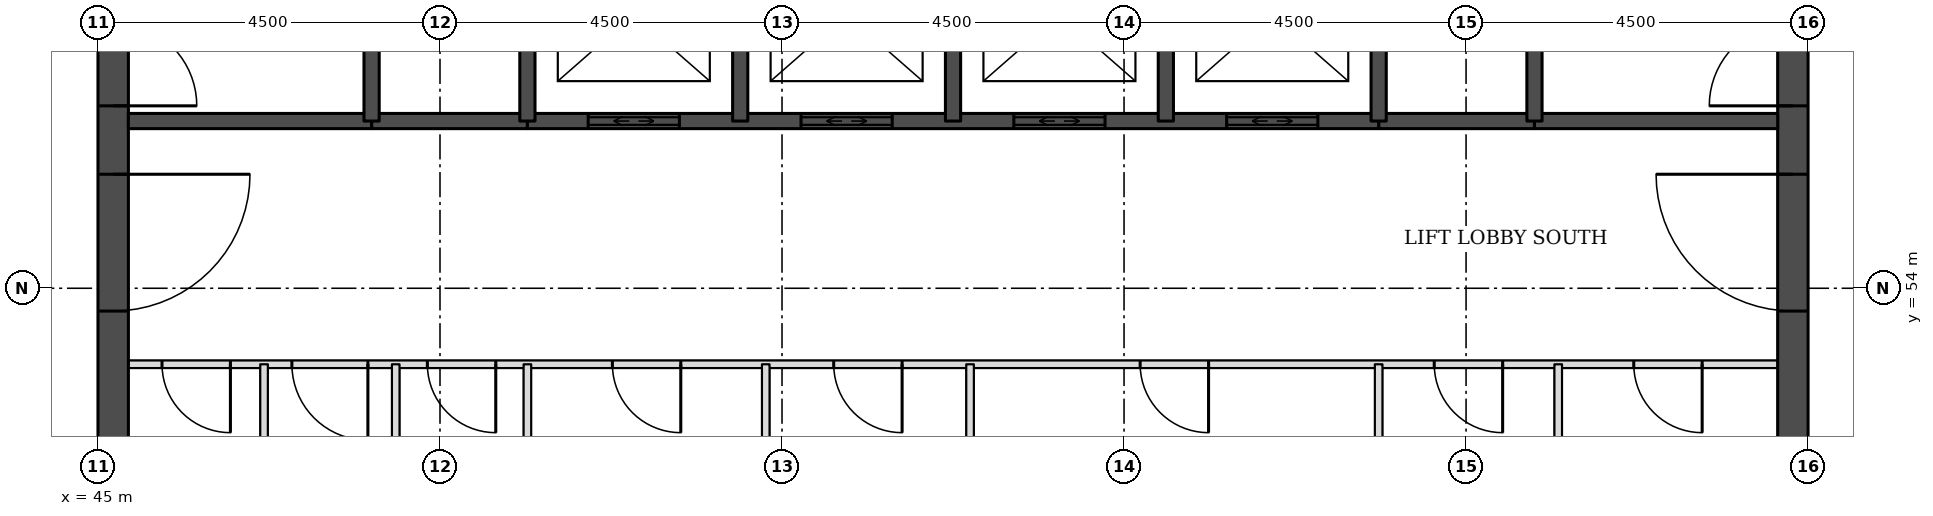
"""IFC4 building model, lengths in metres.
Left out: names, types, materials, properties, quantities, classifications, styles, units other than length and angle.
Written with IfcOpenShell. Run it as: python <this file> out.ifc"""

import sys

from ifc_helpers import new_model, si_unit, direction, frame, frame_2d, origin, place, context, subcontext, project, spatial, rectangle, extrude, element, fill, save


model = new_model("IFC4")
c1 = context("Model", 3, precision=1e-05, world=origin(), true_north=direction((0.0, 1.0)))
c2 = subcontext(c1, "Body", "Model", "MODEL_VIEW")
j1 = project(units=[si_unit("LENGTHUNIT", "METRE"), si_unit("PLANEANGLEUNIT", "RADIAN")], contexts=[c1])
p1 = place(None, origin())
s1 = spatial("IfcSite", under=j1, at=p1, CompositionType="ELEMENT")
p2 = place(p1, origin())
s2 = spatial("IfcBuilding", under=s1, at=p2, CompositionType="ELEMENT")
p3 = place(p2, frame((0.0, 0.0, 188.4)))
s3 = spatial("IfcBuildingStorey", under=s2, at=p3, CompositionType="ELEMENT", Elevation=188.4)
p4 = place(p3, frame((45.2, 49.5, 0.0), z_axis=(0.0, 0.0, 1.0), x_axis=(0.0, 1.0, 0.0)))
e1 = element("IfcWall", 1, at=p4, inside=s3, PredefinedType="SHEAR", context=c2, shape_type="SweptSolid", body=[
    extrude(rectangle(XDim=22.5, YDim=0.4, at=frame_2d((11.25, 0.0))), origin(), (0.0, 0.0, 1.0), 3.7),
])
p5 = place(p4, frame((4.2, 0.0, 0.0)))
e2 = element("IfcOpeningElement", 2, at=p5, cuts=e1, PredefinedType="OPENING", context=c2, shape_type="SweptSolid", body=[
    extrude(rectangle(XDim=1.8, YDim=2.1, at=frame_2d((0.9, 1.05))), frame((0.0, 0.21, 0.0), z_axis=(0.0, -1.0, 0.0), x_axis=(1.0, 0.0, 0.0)), (0.0, 0.0, 1.0), 0.42),
])
p6 = place(p4, frame((6.9, 0.0, 0.0)))
e3 = element("IfcOpeningElement", 3, at=p6, cuts=e1, PredefinedType="OPENING", context=c2, shape_type="SweptSolid", body=[
    extrude(rectangle(XDim=1.1, YDim=2.1, at=frame_2d((0.55, 1.05))), frame((0.0, 0.21, 0.0), z_axis=(0.0, -1.0, 0.0), x_axis=(1.0, 0.0, 0.0)), (0.0, 0.0, 1.0), 0.42),
])
p7 = place(p4, frame((13.6, 0.0, 0.0)))
e4 = element("IfcOpeningElement", 4, at=p7, cuts=e1, PredefinedType="OPENING", context=c2, shape_type="SweptSolid", body=[
    extrude(rectangle(XDim=1.1, YDim=2.1, at=frame_2d((0.55, 1.05))), frame((0.0, 0.21, 0.0), z_axis=(0.0, -1.0, 0.0), x_axis=(1.0, 0.0, 0.0)), (0.0, 0.0, 1.0), 0.42),
])
p8 = place(p4, frame((16.5, 0.0, 0.0)))
e5 = element("IfcOpeningElement", 5, at=p8, cuts=e1, PredefinedType="OPENING", context=c2, shape_type="SweptSolid", body=[
    extrude(rectangle(XDim=1.8, YDim=2.1, at=frame_2d((0.9, 1.05))), frame((0.0, 0.21, 0.0), z_axis=(0.0, -1.0, 0.0), x_axis=(1.0, 0.0, 0.0)), (0.0, 0.0, 1.0), 0.42),
])
p9 = place(p3, frame((67.3, 49.5, 0.0), z_axis=(0.0, 0.0, 1.0), x_axis=(0.0, 1.0, 0.0)))
e6 = element("IfcWall", 6, at=p9, inside=s3, PredefinedType="SHEAR", context=c2, shape_type="SweptSolid", body=[
    extrude(rectangle(XDim=22.5, YDim=0.4, at=frame_2d((11.25, 0.0))), origin(), (0.0, 0.0, 1.0), 3.7),
])
p10 = place(p9, frame((4.2, 0.0, 0.0)))
e7 = element("IfcOpeningElement", 7, at=p10, cuts=e6, PredefinedType="OPENING", context=c2, shape_type="SweptSolid", body=[
    extrude(rectangle(XDim=1.8, YDim=2.1, at=frame_2d((0.9, 1.05))), frame((0.0, 0.21, 0.0), z_axis=(0.0, -1.0, 0.0), x_axis=(1.0, 0.0, 0.0)), (0.0, 0.0, 1.0), 0.42),
])
p11 = place(p9, frame((6.9, 0.0, 0.0)))
e8 = element("IfcOpeningElement", 8, at=p11, cuts=e6, PredefinedType="OPENING", context=c2, shape_type="SweptSolid", body=[
    extrude(rectangle(XDim=1.1, YDim=2.1, at=frame_2d((0.55, 1.05))), frame((0.0, 0.21, 0.0), z_axis=(0.0, -1.0, 0.0), x_axis=(1.0, 0.0, 0.0)), (0.0, 0.0, 1.0), 0.42),
])
p12 = place(p9, frame((13.6, 0.0, 0.0)))
e9 = element("IfcOpeningElement", 9, at=p12, cuts=e6, PredefinedType="OPENING", context=c2, shape_type="SweptSolid", body=[
    extrude(rectangle(XDim=1.1, YDim=2.1, at=frame_2d((0.55, 1.05))), frame((0.0, 0.21, 0.0), z_axis=(0.0, -1.0, 0.0), x_axis=(1.0, 0.0, 0.0)), (0.0, 0.0, 1.0), 0.42),
])
p13 = place(p9, frame((16.5, 0.0, 0.0)))
e10 = element("IfcOpeningElement", 10, at=p13, cuts=e6, PredefinedType="OPENING", context=c2, shape_type="SweptSolid", body=[
    extrude(rectangle(XDim=1.8, YDim=2.1, at=frame_2d((0.9, 1.05))), frame((0.0, 0.21, 0.0), z_axis=(0.0, -1.0, 0.0), x_axis=(1.0, 0.0, 0.0)), (0.0, 0.0, 1.0), 0.42),
])
p14 = place(p3, frame((45.4, 53.0, 0.0), z_axis=(0.0, 0.0, 1.0), x_axis=(1.0, 0.0, 0.0)))
e11 = element("IfcWall", 11, at=p14, inside=s3, PredefinedType="PARTITIONING", context=c2, shape_type="SweptSolid", body=[
    extrude(rectangle(XDim=21.7, YDim=0.1, at=frame_2d((10.85, 0.0))), origin(), (0.0, 0.0, 1.0), 3.55),
])
p15 = place(p14, frame((19.806, 0.0, 0.0)))
e12 = element("IfcOpeningElement", 12, at=p15, cuts=e11, PredefinedType="OPENING", context=c2, shape_type="SweptSolid", body=[
    extrude(rectangle(XDim=0.9, YDim=2.1, at=frame_2d((0.45, 1.05))), frame((0.0, 0.06, 0.0), z_axis=(0.0, -1.0, 0.0), x_axis=(1.0, 0.0, 0.0)), (0.0, 0.0, 1.0), 0.12),
])
p16 = place(p14, frame((17.181, 0.0, 0.0)))
e13 = element("IfcOpeningElement", 13, at=p16, cuts=e11, PredefinedType="OPENING", context=c2, shape_type="SweptSolid", body=[
    extrude(rectangle(XDim=0.9, YDim=2.1, at=frame_2d((0.45, 1.05))), frame((0.0, 0.06, 0.0), z_axis=(0.0, -1.0, 0.0), x_axis=(1.0, 0.0, 0.0)), (0.0, 0.0, 1.0), 0.12),
])
p17 = place(p14, frame((0.442, 0.0, 0.0)))
e14 = element("IfcOpeningElement", 14, at=p17, cuts=e11, PredefinedType="OPENING", context=c2, shape_type="SweptSolid", body=[
    extrude(rectangle(XDim=0.9, YDim=2.1, at=frame_2d((0.45, 1.05))), frame((0.0, 0.06, 0.0), z_axis=(0.0, -1.0, 0.0), x_axis=(1.0, 0.0, 0.0)), (0.0, 0.0, 1.0), 0.12),
])
p18 = place(p14, frame((2.151, 0.0, 0.0)))
e15 = element("IfcOpeningElement", 15, at=p18, cuts=e11, PredefinedType="OPENING", context=c2, shape_type="SweptSolid", body=[
    extrude(rectangle(XDim=1.0, YDim=2.1, at=frame_2d((0.5, 1.05))), frame((0.0, 0.06, 0.0), z_axis=(0.0, -1.0, 0.0), x_axis=(1.0, 0.0, 0.0)), (0.0, 0.0, 1.0), 0.12),
])
p19 = place(p14, frame((3.934, 0.0, 0.0)))
e16 = element("IfcOpeningElement", 16, at=p19, cuts=e11, PredefinedType="OPENING", context=c2, shape_type="SweptSolid", body=[
    extrude(rectangle(XDim=0.9, YDim=2.1, at=frame_2d((0.45, 1.05))), frame((0.0, 0.06, 0.0), z_axis=(0.0, -1.0, 0.0), x_axis=(1.0, 0.0, 0.0)), (0.0, 0.0, 1.0), 0.12),
])
p20 = place(p14, frame((6.368, 0.0, 0.0)))
e17 = element("IfcOpeningElement", 17, at=p20, cuts=e11, PredefinedType="OPENING", context=c2, shape_type="SweptSolid", body=[
    extrude(rectangle(XDim=0.9, YDim=2.1, at=frame_2d((0.45, 1.05))), frame((0.0, 0.06, 0.0), z_axis=(0.0, -1.0, 0.0), x_axis=(1.0, 0.0, 0.0)), (0.0, 0.0, 1.0), 0.12),
])
p21 = place(p14, frame((9.28, 0.0, 0.0)))
e18 = element("IfcOpeningElement", 18, at=p21, cuts=e11, PredefinedType="OPENING", context=c2, shape_type="SweptSolid", body=[
    extrude(rectangle(XDim=0.9, YDim=2.1, at=frame_2d((0.45, 1.05))), frame((0.0, 0.06, 0.0), z_axis=(0.0, -1.0, 0.0), x_axis=(1.0, 0.0, 0.0)), (0.0, 0.0, 1.0), 0.12),
])
p22 = place(p14, frame((13.312, 0.0, 0.0)))
e19 = element("IfcOpeningElement", 19, at=p22, cuts=e11, PredefinedType="OPENING", context=c2, shape_type="SweptSolid", body=[
    extrude(rectangle(XDim=0.9, YDim=2.1, at=frame_2d((0.45, 1.05))), frame((0.0, 0.06, 0.0), z_axis=(0.0, -1.0, 0.0), x_axis=(1.0, 0.0, 0.0)), (0.0, 0.0, 1.0), 0.12),
])
for number, where, z_axis, x_axis in (
    (20, (48.6, 56.2, 0.0), (0.0, 0.0, 1.0), (1.0, 0.0, 0.0)),
    (21, (61.85, 56.2, 0.0), (0.0, 0.0, 1.0), (1.0, 0.0, 0.0)),
):
    element("IfcWall", number, at=place(p3, frame(where, z_axis=z_axis, x_axis=x_axis)), inside=s3, PredefinedType="SOLIDWALL", context=c2, shape_type="SweptSolid", body=[
        extrude(rectangle(XDim=2.05, YDim=0.2, at=frame_2d((1.025, 0.0))), origin(), (0.0, 0.0, 1.0), 3.55),
    ])
p23 = place(p3, frame((45.4, 56.2, 0.0), z_axis=(0.0, 0.0, 1.0), x_axis=(1.0, 0.0, 0.0)))
e22 = element("IfcWall", 22, at=p23, inside=s3, PredefinedType="SOLIDWALL", context=c2, shape_type="SweptSolid", body=[
    extrude(rectangle(XDim=3.2, YDim=0.2, at=frame_2d((1.6, 0.0))), origin(), (0.0, 0.0, 1.0), 3.55),
])
p24 = place(p3, frame((50.65, 56.2, 0.0), z_axis=(0.0, 0.0, 1.0), x_axis=(1.0, 0.0, 0.0)))
e23 = element("IfcWall", 23, at=p24, inside=s3, PredefinedType="SOLIDWALL", context=c2, shape_type="SweptSolid", body=[
    extrude(rectangle(XDim=11.2, YDim=0.2, at=frame_2d((5.6, 0.0))), origin(), (0.0, 0.0, 1.0), 3.55),
])
p25 = place(p24, frame((0.8, 0.0, 0.0)))
e24 = element("IfcOpeningElement", 24, at=p25, cuts=e23, PredefinedType="OPENING", context=c2, shape_type="SweptSolid", body=[
    extrude(rectangle(XDim=1.2, YDim=2.1, at=frame_2d((0.6, 1.05))), frame((0.0, 0.11, 0.0), z_axis=(0.0, -1.0, 0.0), x_axis=(1.0, 0.0, 0.0)), (0.0, 0.0, 1.0), 0.22),
])
p26 = place(p24, frame((3.6, 0.0, 0.0)))
e25 = element("IfcOpeningElement", 25, at=p26, cuts=e23, PredefinedType="OPENING", context=c2, shape_type="SweptSolid", body=[
    extrude(rectangle(XDim=1.2, YDim=2.1, at=frame_2d((0.6, 1.05))), frame((0.0, 0.11, 0.0), z_axis=(0.0, -1.0, 0.0), x_axis=(1.0, 0.0, 0.0)), (0.0, 0.0, 1.0), 0.22),
])
p27 = place(p24, frame((6.4, 0.0, 0.0)))
e26 = element("IfcOpeningElement", 26, at=p27, cuts=e23, PredefinedType="OPENING", context=c2, shape_type="SweptSolid", body=[
    extrude(rectangle(XDim=1.2, YDim=2.1, at=frame_2d((0.6, 1.05))), frame((0.0, 0.11, 0.0), z_axis=(0.0, -1.0, 0.0), x_axis=(1.0, 0.0, 0.0)), (0.0, 0.0, 1.0), 0.22),
])
p28 = place(p24, frame((9.2, 0.0, 0.0)))
e27 = element("IfcOpeningElement", 27, at=p28, cuts=e23, PredefinedType="OPENING", context=c2, shape_type="SweptSolid", body=[
    extrude(rectangle(XDim=1.2, YDim=2.1, at=frame_2d((0.6, 1.05))), frame((0.0, 0.11, 0.0), z_axis=(0.0, -1.0, 0.0), x_axis=(1.0, 0.0, 0.0)), (0.0, 0.0, 1.0), 0.22),
])
p29 = place(p3, frame((63.9, 56.2, 0.0), z_axis=(0.0, 0.0, 1.0), x_axis=(1.0, 0.0, 0.0)))
e28 = element("IfcWall", 28, at=p29, inside=s3, PredefinedType="SOLIDWALL", context=c2, shape_type="SweptSolid", body=[
    extrude(rectangle(XDim=3.2, YDim=0.2, at=frame_2d((1.6, 0.0))), origin(), (0.0, 0.0, 1.0), 3.55),
])
p30 = place(p3, frame((47.185, 49.9, 0.0), z_axis=(0.0, 0.0, 1.0), x_axis=(0.0, 1.0, 0.0)))
e29 = element("IfcWall", 29, at=p30, inside=s3, PredefinedType="PARTITIONING", context=c2, shape_type="SweptSolid", body=[
    extrude(rectangle(XDim=3.1, YDim=0.1, at=frame_2d((1.55, 0.0))), origin(), (0.0, 0.0, 1.0), 3.55),
])
p31 = place(p3, frame((48.6, 56.2, 0.0), z_axis=(0.0, 0.0, 1.0), x_axis=(0.0, 1.0, 0.0)))
e30 = element("IfcWall", 30, at=p31, inside=s3, PredefinedType="SOLIDWALL", context=c2, shape_type="SweptSolid", body=[
    extrude(rectangle(XDim=5.8, YDim=0.2, at=frame_2d((2.9, 0.0))), origin(), (0.0, 0.0, 1.0), 3.55),
])
for number, where, z_axis, x_axis in (
    (31, (48.917, 49.9, 0.0), (0.0, 0.0, 1.0), (0.0, 1.0, 0.0)),
    (32, (50.65, 49.9, 0.0), (0.0, 0.0, 1.0), (0.0, 1.0, 0.0)),
):
    element("IfcWall", number, at=place(p3, frame(where, z_axis=z_axis, x_axis=x_axis)), inside=s3, PredefinedType="PARTITIONING", context=c2, shape_type="SweptSolid", body=[
        extrude(rectangle(XDim=3.1, YDim=0.1, at=frame_2d((1.55, 0.0))), origin(), (0.0, 0.0, 1.0), 3.55),
    ])
for number, where, z_axis, x_axis in (
    (33, (50.65, 56.2, 0.0), (0.0, 0.0, 1.0), (0.0, 1.0, 0.0)),
    (34, (53.45, 56.2, 0.0), (0.0, 0.0, 1.0), (0.0, 1.0, 0.0)),
):
    element("IfcWall", number, at=place(p3, frame(where, z_axis=z_axis, x_axis=x_axis)), inside=s3, PredefinedType="SOLIDWALL", context=c2, shape_type="SweptSolid", body=[
        extrude(rectangle(XDim=2.8, YDim=0.2, at=frame_2d((1.4, 0.0))), origin(), (0.0, 0.0, 1.0), 3.55),
    ])
p32 = place(p3, frame((53.786, 49.9, 0.0), z_axis=(0.0, 0.0, 1.0), x_axis=(0.0, 1.0, 0.0)))
e35 = element("IfcWall", 35, at=p32, inside=s3, PredefinedType="PARTITIONING", context=c2, shape_type="SweptSolid", body=[
    extrude(rectangle(XDim=3.1, YDim=0.1, at=frame_2d((1.55, 0.0))), origin(), (0.0, 0.0, 1.0), 3.55),
])
p33 = place(p3, frame((56.25, 56.2, 0.0), z_axis=(0.0, 0.0, 1.0), x_axis=(0.0, 1.0, 0.0)))
e36 = element("IfcWall", 36, at=p33, inside=s3, PredefinedType="SOLIDWALL", context=c2, shape_type="SweptSolid", body=[
    extrude(rectangle(XDim=2.8, YDim=0.2, at=frame_2d((1.4, 0.0))), origin(), (0.0, 0.0, 1.0), 3.55),
])
p34 = place(p3, frame((56.474, 49.9, 0.0), z_axis=(0.0, 0.0, 1.0), x_axis=(0.0, 1.0, 0.0)))
e37 = element("IfcWall", 37, at=p34, inside=s3, PredefinedType="PARTITIONING", context=c2, shape_type="SweptSolid", body=[
    extrude(rectangle(XDim=3.1, YDim=0.1, at=frame_2d((1.55, 0.0))), origin(), (0.0, 0.0, 1.0), 3.55),
])
p35 = place(p3, frame((59.05, 56.2, 0.0), z_axis=(0.0, 0.0, 1.0), x_axis=(0.0, 1.0, 0.0)))
e38 = element("IfcWall", 38, at=p35, inside=s3, PredefinedType="SOLIDWALL", context=c2, shape_type="SweptSolid", body=[
    extrude(rectangle(XDim=2.8, YDim=0.2, at=frame_2d((1.4, 0.0))), origin(), (0.0, 0.0, 1.0), 3.55),
])
p36 = place(p3, frame((61.85, 49.9, 0.0), z_axis=(0.0, 0.0, 1.0), x_axis=(0.0, 1.0, 0.0)))
e39 = element("IfcWall", 39, at=p36, inside=s3, PredefinedType="PARTITIONING", context=c2, shape_type="SweptSolid", body=[
    extrude(rectangle(XDim=3.1, YDim=0.1, at=frame_2d((1.55, 0.0))), origin(), (0.0, 0.0, 1.0), 3.55),
])
p37 = place(p3, frame((61.85, 56.2, 0.0), z_axis=(0.0, 0.0, 1.0), x_axis=(0.0, 1.0, 0.0)))
e40 = element("IfcWall", 40, at=p37, inside=s3, PredefinedType="SOLIDWALL", context=c2, shape_type="SweptSolid", body=[
    extrude(rectangle(XDim=2.8, YDim=0.2, at=frame_2d((1.4, 0.0))), origin(), (0.0, 0.0, 1.0), 3.55),
])
p38 = place(p3, frame((63.9, 56.2, 0.0), z_axis=(0.0, 0.0, 1.0), x_axis=(0.0, 1.0, 0.0)))
e41 = element("IfcWall", 41, at=p38, inside=s3, PredefinedType="SOLIDWALL", context=c2, shape_type="SweptSolid", body=[
    extrude(rectangle(XDim=5.8, YDim=0.2, at=frame_2d((2.9, 0.0))), origin(), (0.0, 0.0, 1.0), 3.55),
])
p39 = place(p3, frame((64.212, 49.9, 0.0), z_axis=(0.0, 0.0, 1.0), x_axis=(0.0, 1.0, 0.0)))
e42 = element("IfcWall", 42, at=p39, inside=s3, PredefinedType="PARTITIONING", context=c2, shape_type="SweptSolid", body=[
    extrude(rectangle(XDim=3.1, YDim=0.1, at=frame_2d((1.55, 0.0))), origin(), (0.0, 0.0, 1.0), 3.55),
])
p40 = place(p25, origin())
e43 = element("IfcDoor", 43, at=p40, inside=s3, OperationType="DOUBLE_DOOR_SLIDING", PredefinedType="DOOR", context=c2, shape_type="SweptSolid", body=[
    extrude(rectangle(XDim=1.2, YDim=2.1, at=frame_2d((0.6, 1.05))), frame((0.0, 0.025, 0.0), z_axis=(0.0, -1.0, 0.0), x_axis=(1.0, 0.0, 0.0)), (0.0, 0.0, 1.0), 0.05),
])
fill(e24, e43)
p41 = place(p26, origin())
e44 = element("IfcDoor", 44, at=p41, inside=s3, OperationType="DOUBLE_DOOR_SLIDING", PredefinedType="DOOR", context=c2, shape_type="SweptSolid", body=[
    extrude(rectangle(XDim=1.2, YDim=2.1, at=frame_2d((0.6, 1.05))), frame((0.0, 0.025, 0.0), z_axis=(0.0, -1.0, 0.0), x_axis=(1.0, 0.0, 0.0)), (0.0, 0.0, 1.0), 0.05),
])
fill(e25, e44)
p42 = place(p27, origin())
e45 = element("IfcDoor", 45, at=p42, inside=s3, OperationType="DOUBLE_DOOR_SLIDING", PredefinedType="DOOR", context=c2, shape_type="SweptSolid", body=[
    extrude(rectangle(XDim=1.2, YDim=2.1, at=frame_2d((0.6, 1.05))), frame((0.0, 0.025, 0.0), z_axis=(0.0, -1.0, 0.0), x_axis=(1.0, 0.0, 0.0)), (0.0, 0.0, 1.0), 0.05),
])
fill(e26, e45)
p43 = place(p28, origin())
e46 = element("IfcDoor", 46, at=p43, inside=s3, OperationType="DOUBLE_DOOR_SLIDING", PredefinedType="DOOR", context=c2, shape_type="SweptSolid", body=[
    extrude(rectangle(XDim=1.2, YDim=2.1, at=frame_2d((0.6, 1.05))), frame((0.0, 0.025, 0.0), z_axis=(0.0, -1.0, 0.0), x_axis=(1.0, 0.0, 0.0)), (0.0, 0.0, 1.0), 0.05),
])
fill(e27, e46)
p44 = place(p5, frame((1.8, 0.0, 0.0), z_axis=(0.0, 0.0, 1.0), x_axis=(-1.0, 0.0, 0.0)))
e47 = element("IfcDoor", 47, at=p44, inside=s3, OperationType="SINGLE_SWING_LEFT", PredefinedType="DOOR", context=c2, shape_type="SweptSolid", body=[
    extrude(rectangle(XDim=1.8, YDim=2.1, at=frame_2d((0.9, 1.05))), frame((0.0, 0.025, 0.0), z_axis=(0.0, -1.0, 0.0), x_axis=(1.0, 0.0, 0.0)), (0.0, 0.0, 1.0), 0.05),
])
fill(e2, e47)
p45 = place(p6, frame((1.1, 0.0, 0.0), z_axis=(0.0, 0.0, 1.0), x_axis=(-1.0, 0.0, 0.0)))
e48 = element("IfcDoor", 48, at=p45, inside=s3, OperationType="SINGLE_SWING_RIGHT", PredefinedType="DOOR", context=c2, shape_type="SweptSolid", body=[
    extrude(rectangle(XDim=1.1, YDim=2.1, at=frame_2d((0.55, 1.05))), frame((0.0, 0.025, 0.0), z_axis=(0.0, -1.0, 0.0), x_axis=(1.0, 0.0, 0.0)), (0.0, 0.0, 1.0), 0.05),
])
fill(e3, e48)
p46 = place(p10, origin())
e49 = element("IfcDoor", 49, at=p46, inside=s3, OperationType="SINGLE_SWING_RIGHT", PredefinedType="DOOR", context=c2, shape_type="SweptSolid", body=[
    extrude(rectangle(XDim=1.8, YDim=2.1, at=frame_2d((0.9, 1.05))), frame((0.0, 0.025, 0.0), z_axis=(0.0, -1.0, 0.0), x_axis=(1.0, 0.0, 0.0)), (0.0, 0.0, 1.0), 0.05),
])
fill(e7, e49)
p47 = place(p11, origin())
e50 = element("IfcDoor", 50, at=p47, inside=s3, OperationType="SINGLE_SWING_LEFT", PredefinedType="DOOR", context=c2, shape_type="SweptSolid", body=[
    extrude(rectangle(XDim=1.1, YDim=2.1, at=frame_2d((0.55, 1.05))), frame((0.0, 0.025, 0.0), z_axis=(0.0, -1.0, 0.0), x_axis=(1.0, 0.0, 0.0)), (0.0, 0.0, 1.0), 0.05),
])
fill(e8, e50)
p48 = place(p15, frame((0.9, 0.0, 0.0), z_axis=(0.0, 0.0, 1.0), x_axis=(-1.0, 0.0, 0.0)))
e51 = element("IfcDoor", 51, at=p48, inside=s3, OperationType="SINGLE_SWING_LEFT", PredefinedType="DOOR", context=c2, shape_type="SweptSolid", body=[
    extrude(rectangle(XDim=0.9, YDim=2.1, at=frame_2d((0.45, 1.05))), frame((0.0, 0.025, 0.0), z_axis=(0.0, -1.0, 0.0), x_axis=(1.0, 0.0, 0.0)), (0.0, 0.0, 1.0), 0.05),
])
fill(e12, e51)
p49 = place(p16, frame((0.9, 0.0, 0.0), z_axis=(0.0, 0.0, 1.0), x_axis=(-1.0, 0.0, 0.0)))
e52 = element("IfcDoor", 52, at=p49, inside=s3, OperationType="SINGLE_SWING_LEFT", PredefinedType="DOOR", context=c2, shape_type="SweptSolid", body=[
    extrude(rectangle(XDim=0.9, YDim=2.1, at=frame_2d((0.45, 1.05))), frame((0.0, 0.025, 0.0), z_axis=(0.0, -1.0, 0.0), x_axis=(1.0, 0.0, 0.0)), (0.0, 0.0, 1.0), 0.05),
])
fill(e13, e52)
p50 = place(p17, frame((0.9, 0.0, 0.0), z_axis=(0.0, 0.0, 1.0), x_axis=(-1.0, 0.0, 0.0)))
e53 = element("IfcDoor", 53, at=p50, inside=s3, OperationType="SINGLE_SWING_LEFT", PredefinedType="DOOR", context=c2, shape_type="SweptSolid", body=[
    extrude(rectangle(XDim=0.9, YDim=2.1, at=frame_2d((0.45, 1.05))), frame((0.0, 0.025, 0.0), z_axis=(0.0, -1.0, 0.0), x_axis=(1.0, 0.0, 0.0)), (0.0, 0.0, 1.0), 0.05),
])
fill(e14, e53)
p51 = place(p18, frame((1.0, 0.0, 0.0), z_axis=(0.0, 0.0, 1.0), x_axis=(-1.0, 0.0, 0.0)))
e54 = element("IfcDoor", 54, at=p51, inside=s3, OperationType="SINGLE_SWING_LEFT", PredefinedType="DOOR", context=c2, shape_type="SweptSolid", body=[
    extrude(rectangle(XDim=1.0, YDim=2.1, at=frame_2d((0.5, 1.05))), frame((0.0, 0.025, 0.0), z_axis=(0.0, -1.0, 0.0), x_axis=(1.0, 0.0, 0.0)), (0.0, 0.0, 1.0), 0.05),
])
fill(e15, e54)
p52 = place(p19, frame((0.9, 0.0, 0.0), z_axis=(0.0, 0.0, 1.0), x_axis=(-1.0, 0.0, 0.0)))
e55 = element("IfcDoor", 55, at=p52, inside=s3, OperationType="SINGLE_SWING_LEFT", PredefinedType="DOOR", context=c2, shape_type="SweptSolid", body=[
    extrude(rectangle(XDim=0.9, YDim=2.1, at=frame_2d((0.45, 1.05))), frame((0.0, 0.025, 0.0), z_axis=(0.0, -1.0, 0.0), x_axis=(1.0, 0.0, 0.0)), (0.0, 0.0, 1.0), 0.05),
])
fill(e16, e55)
p53 = place(p20, frame((0.9, 0.0, 0.0), z_axis=(0.0, 0.0, 1.0), x_axis=(-1.0, 0.0, 0.0)))
e56 = element("IfcDoor", 56, at=p53, inside=s3, OperationType="SINGLE_SWING_LEFT", PredefinedType="DOOR", context=c2, shape_type="SweptSolid", body=[
    extrude(rectangle(XDim=0.9, YDim=2.1, at=frame_2d((0.45, 1.05))), frame((0.0, 0.025, 0.0), z_axis=(0.0, -1.0, 0.0), x_axis=(1.0, 0.0, 0.0)), (0.0, 0.0, 1.0), 0.05),
])
fill(e17, e56)
p54 = place(p21, frame((0.9, 0.0, 0.0), z_axis=(0.0, 0.0, 1.0), x_axis=(-1.0, 0.0, 0.0)))
e57 = element("IfcDoor", 57, at=p54, inside=s3, OperationType="SINGLE_SWING_LEFT", PredefinedType="DOOR", context=c2, shape_type="SweptSolid", body=[
    extrude(rectangle(XDim=0.9, YDim=2.1, at=frame_2d((0.45, 1.05))), frame((0.0, 0.025, 0.0), z_axis=(0.0, -1.0, 0.0), x_axis=(1.0, 0.0, 0.0)), (0.0, 0.0, 1.0), 0.05),
])
fill(e18, e57)
p55 = place(p22, frame((0.9, 0.0, 0.0), z_axis=(0.0, 0.0, 1.0), x_axis=(-1.0, 0.0, 0.0)))
e58 = element("IfcDoor", 58, at=p55, inside=s3, OperationType="SINGLE_SWING_LEFT", PredefinedType="DOOR", context=c2, shape_type="SweptSolid", body=[
    extrude(rectangle(XDim=0.9, YDim=2.1, at=frame_2d((0.45, 1.05))), frame((0.0, 0.025, 0.0), z_axis=(0.0, -1.0, 0.0), x_axis=(1.0, 0.0, 0.0)), (0.0, 0.0, 1.0), 0.05),
])
fill(e19, e58)
save(model, sys.argv[1])
